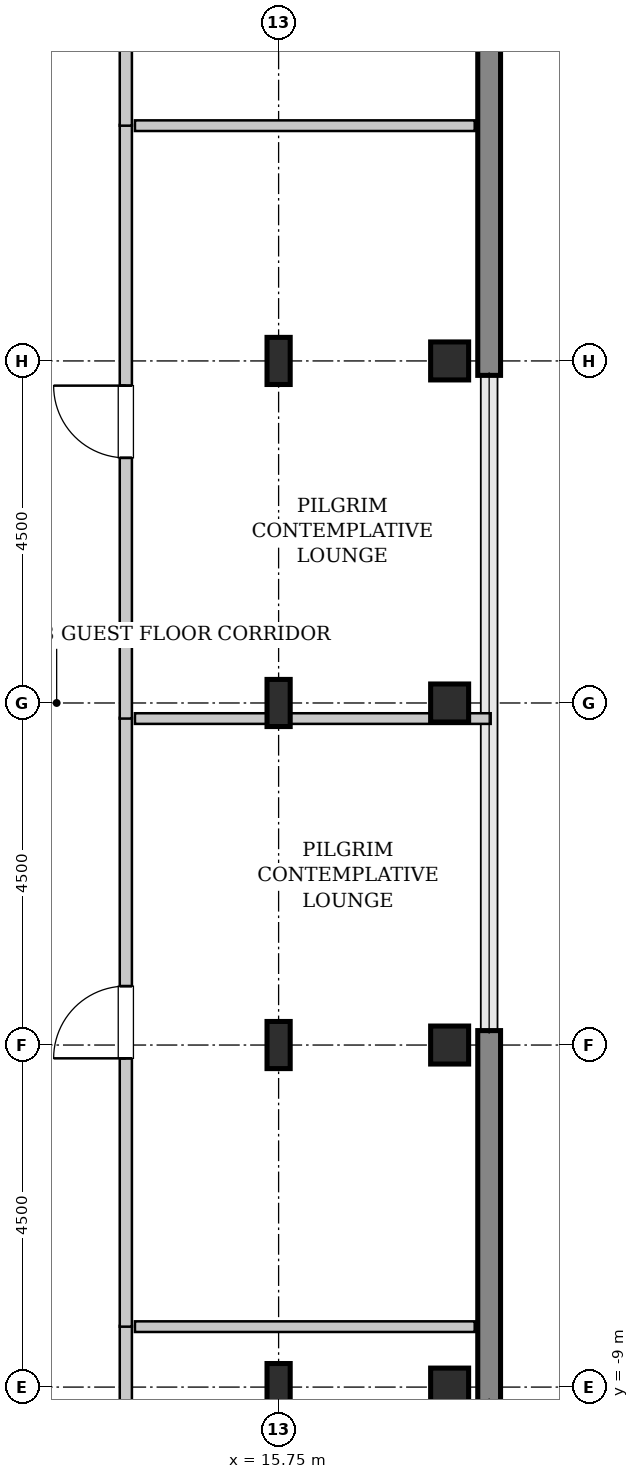
"""IFC4 building model, lengths in metres.
Left out: names, types, materials, properties, quantities, classifications, styles, units other than length and angle.
Written with IfcOpenShell. Run it as: python <this file> out.ifc"""

import sys

from ifc_helpers import new_model, si_unit, direction, frame, frame_2d, origin, origin_2d, place, context, subcontext, project, spatial, rectangle, hollow_rectangle, i_section, extrude, source, transform, mapped, element, fill, save


model = new_model("IFC4")
c1 = context("Model", 3, precision=1e-05, world=origin(), true_north=direction((0.0, 1.0)))
c2 = subcontext(c1, "Body", "Model", "MODEL_VIEW")
j1 = project(units=[si_unit("LENGTHUNIT", "METRE"), si_unit("PLANEANGLEUNIT", "RADIAN")], contexts=[c1])
p1 = place(None, origin())
s1 = spatial("IfcSite", under=j1, at=p1, CompositionType="ELEMENT")
p2 = place(p1, origin())
s2 = spatial("IfcBuilding", under=s1, at=p2, CompositionType="ELEMENT")
p3 = place(p2, frame((0.0, 0.0, 310.2)))
s3 = spatial("IfcBuildingStorey", under=s2, at=p3, CompositionType="ELEMENT", Elevation=310.2)
m1 = source(origin(), c2, "Body", "SweptSolid", [
    extrude(i_section(OverallWidth=0.305, OverallDepth=0.62, WebThickness=0.021, FlangeThickness=0.04, FilletRadius=0.027, at=origin_2d()), origin(), (0.0, 0.0, 1.0), 3.8),
])
for number, where, z_axis, x_axis in (
    (1, (15.75, -9.0, 0.0), (0.0, 0.0, 1.0), (1.0, 0.0, 0.0)),
    (2, (15.75, -4.5, 0.0), (0.0, 0.0, 1.0), (1.0, 0.0, 0.0)),
    (3, (15.75, 0.0, 0.0), (0.0, 0.0, 1.0), (1.0, 0.0, 0.0)),
    (4, (15.75, 4.5, 0.0), (0.0, 0.0, 1.0), (1.0, 0.0, 0.0)),
):
    element("IfcColumn", number, at=place(p3, frame(where, z_axis=z_axis, x_axis=x_axis)), inside=s3, PredefinedType="COLUMN", context=c2, shape_type="MappedRepresentation", body=[
        mapped(m1, transform((0.0, 0.0, 0.0), x_axis=(1.0, 0.0, 0.0), y_axis=(0.0, 1.0, 0.0), z_axis=(0.0, 0.0, 1.0), scale=1.0)),
    ])
m2 = source(origin(), c2, "Body", "SweptSolid", [
    extrude(hollow_rectangle(XDim=0.5, YDim=0.5, WallThickness=0.025, InnerFilletRadius=0.025, OuterFilletRadius=0.05, at=origin_2d()), origin(), (0.0, 0.0, 1.0), 3.8),
])
for number, where, z_axis, x_axis in (
    (5, (18.0, -9.0, 0.0), (0.0, 0.0, 1.0), (1.0, 0.0, 0.0)),
    (6, (18.0, -4.5, 0.0), (0.0, 0.0, 1.0), (1.0, 0.0, 0.0)),
    (7, (18.0, 0.0, 0.0), (0.0, 0.0, 1.0), (1.0, 0.0, 0.0)),
    (8, (18.0, 4.5, 0.0), (0.0, 0.0, 1.0), (1.0, 0.0, 0.0)),
):
    element("IfcColumn", number, at=place(p3, frame(where, z_axis=z_axis, x_axis=x_axis)), inside=s3, PredefinedType="COLUMN", context=c2, shape_type="MappedRepresentation", body=[
        mapped(m2, transform((0.0, 0.0, 0.0), x_axis=(1.0, 0.0, 0.0), y_axis=(0.0, 1.0, 0.0), z_axis=(0.0, 0.0, 1.0), scale=1.0)),
    ])
m3 = source(origin(), c2, "Body", "SweptSolid", [
    extrude(rectangle(XDim=4.88, YDim=0.3, at=frame_2d((2.44, 0.0))), origin(), (0.0, 0.0, 1.0), 3.55),
])
for number, where, z_axis, x_axis in (
    (9, (18.52, -9.19, 0.0), (0.0, 0.0, 1.0), (0.0, 1.0, 0.0)),
    (10, (18.52, 4.31, 0.0), (0.0, 0.0, 1.0), (0.0, 1.0, 0.0)),
):
    element("IfcWall", number, at=place(p3, frame(where, z_axis=z_axis, x_axis=x_axis)), inside=s3, PredefinedType="SHEAR", context=c2, shape_type="MappedRepresentation", body=[
        mapped(m3, transform((0.0, 0.0, 0.0), x_axis=(1.0, 0.0, 0.0), y_axis=(0.0, 1.0, 0.0), z_axis=(0.0, 0.0, 1.0), scale=1.0)),
    ])
m4 = source(origin(), c2, "Body", "SweptSolid", [
    extrude(rectangle(XDim=11.965, YDim=0.16, at=frame_2d((5.982, 0.0))), origin(), (0.0, 0.0, 1.0), 3.535),
])
p4 = place(p3, frame((13.74, -20.16, 0.0), z_axis=(0.0, 0.0, 1.0), x_axis=(0.0, 1.0, 0.0)))
e11 = element("IfcWall", 11, at=p4, inside=s3, PredefinedType="PARTITIONING", context=c2, shape_type="MappedRepresentation", body=[
    mapped(m4, transform((0.0, 0.0, 0.0), x_axis=(1.0, 0.0, 0.0), y_axis=(0.0, 1.0, 0.0), z_axis=(0.0, 0.0, 1.0), scale=1.0)),
])
p5 = place(p4, frame((9.833, 0.0, 0.0)))
e12 = element("IfcOpeningElement", 12, at=p5, cuts=e11, PredefinedType="OPENING", context=c2, shape_type="SweptSolid", body=[
    extrude(rectangle(XDim=0.95, YDim=2.1, at=frame_2d((0.475, 1.05))), frame((0.0, 0.09, 0.0), z_axis=(0.0, -1.0, 0.0), x_axis=(1.0, 0.0, 0.0)), (0.0, 0.0, 1.0), 0.18),
])
m5 = source(origin(), c2, "Body", "SweptSolid", [
    extrude(rectangle(XDim=4.47, YDim=0.14, at=frame_2d((2.235, 0.0))), origin(), (0.0, 0.0, 1.0), 3.535),
])
p6 = place(p3, frame((13.86, -8.205, 0.0), z_axis=(0.0, 0.0, 1.0), x_axis=(1.0, 0.0, 0.0)))
e13 = element("IfcWall", 13, at=p6, inside=s3, PredefinedType="PARTITIONING", context=c2, shape_type="MappedRepresentation", body=[
    mapped(m5, transform((0.0, 0.0, 0.0), x_axis=(1.0, 0.0, 0.0), y_axis=(0.0, 1.0, 0.0), z_axis=(0.0, 0.0, 1.0), scale=1.0)),
])
m6 = source(origin(), c2, "Body", "SweptSolid", [
    extrude(rectangle(XDim=8.01, YDim=0.16, at=frame_2d((4.005, 0.0))), origin(), (0.0, 0.0, 1.0), 3.535),
])
p7 = place(p3, frame((13.74, -8.205, 0.0), z_axis=(0.0, 0.0, 1.0), x_axis=(0.0, 1.0, 0.0)))
e14 = element("IfcWall", 14, at=p7, inside=s3, PredefinedType="PARTITIONING", context=c2, shape_type="MappedRepresentation", body=[
    mapped(m6, transform((0.0, 0.0, 0.0), x_axis=(1.0, 0.0, 0.0), y_axis=(0.0, 1.0, 0.0), z_axis=(0.0, 0.0, 1.0), scale=1.0)),
])
p8 = place(p7, frame((3.53, 0.0, 0.0)))
e15 = element("IfcOpeningElement", 15, at=p8, cuts=e14, PredefinedType="OPENING", context=c2, shape_type="SweptSolid", body=[
    extrude(rectangle(XDim=0.95, YDim=2.1, at=frame_2d((0.475, 1.05))), frame((0.0, 0.09, 0.0), z_axis=(0.0, -1.0, 0.0), x_axis=(1.0, 0.0, 0.0)), (0.0, 0.0, 1.0), 0.18),
])
m7 = source(origin(), c2, "Body", "SweptSolid", [
    extrude(rectangle(XDim=4.68, YDim=0.14, at=frame_2d((2.34, 0.0))), origin(), (0.0, 0.0, 1.0), 2.975),
])
p9 = place(p3, frame((13.86, -0.205, 0.0), z_axis=(0.0, 0.0, 1.0), x_axis=(1.0, 0.0, 0.0)))
e16 = element("IfcWall", 16, at=p9, inside=s3, PredefinedType="PARTITIONING", context=c2, shape_type="MappedRepresentation", body=[
    mapped(m7, transform((0.0, 0.0, 0.0), x_axis=(1.0, 0.0, 0.0), y_axis=(0.0, 1.0, 0.0), z_axis=(0.0, 0.0, 1.0), scale=1.0)),
])
m8 = source(origin(), c2, "Body", "SweptSolid", [
    extrude(rectangle(XDim=7.81, YDim=0.16, at=frame_2d((3.905, 0.0))), origin(), (0.0, 0.0, 1.0), 3.535),
])
p10 = place(p3, frame((13.74, -0.205, 0.0), z_axis=(0.0, 0.0, 1.0), x_axis=(0.0, 1.0, 0.0)))
e17 = element("IfcWall", 17, at=p10, inside=s3, PredefinedType="PARTITIONING", context=c2, shape_type="MappedRepresentation", body=[
    mapped(m8, transform((0.0, 0.0, 0.0), x_axis=(1.0, 0.0, 0.0), y_axis=(0.0, 1.0, 0.0), z_axis=(0.0, 0.0, 1.0), scale=1.0)),
])
p11 = place(p10, frame((3.43, 0.0, 0.0)))
e18 = element("IfcOpeningElement", 18, at=p11, cuts=e17, PredefinedType="OPENING", context=c2, shape_type="SweptSolid", body=[
    extrude(rectangle(XDim=0.95, YDim=2.1, at=frame_2d((0.475, 1.05))), frame((0.0, 0.09, 0.0), z_axis=(0.0, -1.0, 0.0), x_axis=(1.0, 0.0, 0.0)), (0.0, 0.0, 1.0), 0.18),
])
p12 = place(p3, frame((13.86, 7.595, 0.0), z_axis=(0.0, 0.0, 1.0), x_axis=(1.0, 0.0, 0.0)))
e19 = element("IfcWall", 19, at=p12, inside=s3, PredefinedType="PARTITIONING", context=c2, shape_type="MappedRepresentation", body=[
    mapped(m5, transform((0.0, 0.0, 0.0), x_axis=(1.0, 0.0, 0.0), y_axis=(0.0, 1.0, 0.0), z_axis=(0.0, 0.0, 1.0), scale=1.0)),
])
m9 = source(origin(), c2, "Body", "SweptSolid", [
    extrude(rectangle(XDim=12.565, YDim=0.16, at=frame_2d((6.282, 0.0))), origin(), (0.0, 0.0, 1.0), 3.535),
])
p13 = place(p3, frame((13.74, 7.595, 0.0), z_axis=(0.0, 0.0, 1.0), x_axis=(0.0, 1.0, 0.0)))
e20 = element("IfcWall", 20, at=p13, inside=s3, PredefinedType="PARTITIONING", context=c2, shape_type="MappedRepresentation", body=[
    mapped(m9, transform((0.0, 0.0, 0.0), x_axis=(1.0, 0.0, 0.0), y_axis=(0.0, 1.0, 0.0), z_axis=(0.0, 0.0, 1.0), scale=1.0)),
])
p14 = place(p13, frame((1.482, 0.0, 0.0)))
e21 = element("IfcOpeningElement", 21, at=p14, cuts=e20, PredefinedType="OPENING", context=c2, shape_type="SweptSolid", body=[
    extrude(rectangle(XDim=0.95, YDim=2.1, at=frame_2d((0.475, 1.05))), frame((0.0, 0.09, 0.0), z_axis=(0.0, -1.0, 0.0), x_axis=(1.0, 0.0, 0.0)), (0.0, 0.0, 1.0), 0.18),
])
m10 = source(origin(), c2, "Body", "SweptSolid", [
    extrude(rectangle(XDim=0.95, YDim=2.1, at=frame_2d((0.475, 1.05))), frame((0.0, 0.025, 0.0), z_axis=(0.0, -1.0, 0.0), x_axis=(1.0, 0.0, 0.0)), (0.0, 0.0, 1.0), 0.05),
])
p15 = place(p8, origin())
e22 = element("IfcDoor", 22, at=p15, inside=s3, OperationType="SINGLE_SWING_LEFT", PredefinedType="DOOR", context=c2, shape_type="MappedRepresentation", body=[
    mapped(m10, transform((0.0, 0.0, 0.0), x_axis=(1.0, 0.0, 0.0), y_axis=(0.0, 1.0, 0.0), z_axis=(0.0, 0.0, 1.0), scale=1.0)),
])
fill(e15, e22)
p16 = place(p11, origin())
e23 = element("IfcDoor", 23, at=p16, inside=s3, OperationType="SINGLE_SWING_RIGHT", PredefinedType="DOOR", context=c2, shape_type="MappedRepresentation", body=[
    mapped(m10, transform((0.0, 0.0, 0.0), x_axis=(1.0, 0.0, 0.0), y_axis=(0.0, 1.0, 0.0), z_axis=(0.0, 0.0, 1.0), scale=1.0)),
])
fill(e18, e23)
save(model, sys.argv[1])
